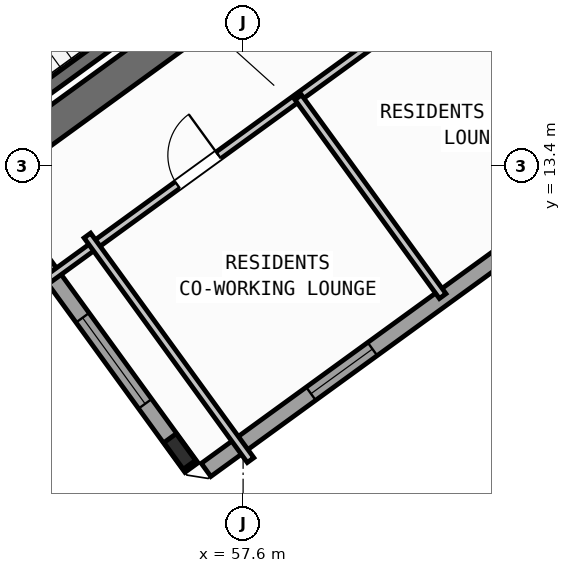
"""IFC4 building model, lengths in metres.
Left out: names, types, materials, properties, quantities, classifications, styles, units other than length and angle.
Written with IfcOpenShell. Run it as: python <this file> out.ifc"""

import sys

from ifc_helpers import new_model, si_unit, direction, frame, frame_2d, origin, origin_2d, place, context, subcontext, project, spatial, rectangle, i_section, extrude, source, transform, mapped, element, fill, save


model = new_model("IFC4")
c1 = context("Model", 3, precision=1e-05, world=origin(), true_north=direction((0.0, 1.0)))
c2 = subcontext(c1, "Body", "Model", "MODEL_VIEW")
j1 = project(units=[si_unit("LENGTHUNIT", "METRE"), si_unit("PLANEANGLEUNIT", "RADIAN")], contexts=[c1])
p1 = place(None, origin())
s1 = spatial("IfcSite", under=j1, at=p1, CompositionType="ELEMENT")
p2 = place(p1, origin())
s2 = spatial("IfcBuilding", under=s1, at=p2, CompositionType="ELEMENT")
p3 = place(p2, frame((0.0, 0.0, 42.0)))
s3 = spatial("IfcBuildingStorey", under=s2, at=p3, CompositionType="ELEMENT", Elevation=42.0)
p4 = place(p3, frame((52.318, 13.11, 0.0), z_axis=(0.0, 0.0, 1.0), x_axis=(0.809019445368, 0.587781878776, 0.0)))
e1 = element("IfcWall", 1, at=p4, inside=s3, PredefinedType="SHEAR", context=c2, shape_type="SweptSolid", body=[
    extrude(rectangle(XDim=12.44, YDim=0.65, at=frame_2d((6.22, 0.0))), origin(), (0.0, 0.0, 1.0), 3.35),
])
m1 = source(origin(), c2, "Body", "SweptSolid", [
    extrude(i_section(OverallWidth=0.3, OverallDepth=0.65, WebThickness=0.016, FlangeThickness=0.031, at=origin_2d()), origin(), (0.0, 0.0, 1.0), 3.6),
])
p5 = place(p3, frame((56.35, 7.758, 0.0), z_axis=(0.0, 0.0, 1.0), x_axis=(0.809016994375, 0.587785252292, 0.0)))
e2 = element("IfcColumn", 2, at=p5, inside=s3, PredefinedType="COLUMN", context=c2, shape_type="MappedRepresentation", body=[
    mapped(m1, transform((0.0, 0.0, 0.0), scale=1.0)),
])
p6 = place(p3, frame((71.098, 17.731, 0.0), z_axis=(0.0, 0.0, 1.0), x_axis=(-0.809021120468, -0.587779573171, 0.0)))
e3 = element("IfcWall", 3, at=p6, inside=s3, PredefinedType="STANDARD", context=c2, shape_type="SweptSolid", body=[
    extrude(rectangle(XDim=17.588, YDim=0.32, at=frame_2d((8.794, 0.0))), origin(), (0.0, 0.0, 1.0), 3.35),
])
p7 = place(p6, frame((1.624, 0.0, 0.0)))
e4 = element("IfcOpeningElement", 4, at=p7, cuts=e3, PredefinedType="OPENING", context=c2, shape_type="SweptSolid", body=[
    extrude(rectangle(XDim=1.05, YDim=2.15, at=frame_2d((0.525, 1.075))), frame((0.0, 0.17, 0.0), z_axis=(0.0, -1.0, 0.0), x_axis=(1.0, 0.0, 0.0)), (0.0, 0.0, 1.0), 0.34),
])
p8 = place(p6, frame((4.104, 0.0, 1.0)))
e5 = element("IfcOpeningElement", 5, at=p8, cuts=e3, PredefinedType="OPENING", context=c2, shape_type="SweptSolid", body=[
    extrude(rectangle(XDim=0.9, YDim=1.25, at=frame_2d((0.45, 0.625))), frame((0.0, 0.17, 0.0), z_axis=(0.0, -1.0, 0.0), x_axis=(1.0, 0.0, 0.0)), (0.0, 0.0, 1.0), 0.34),
])
p9 = place(p6, frame((7.879, 0.0, 0.85)))
e6 = element("IfcOpeningElement", 6, at=p9, cuts=e3, PredefinedType="OPENING", context=c2, shape_type="SweptSolid", body=[
    extrude(rectangle(XDim=1.8, YDim=1.5, at=frame_2d((0.9, 0.75))), frame((0.0, 0.17, 0.0), z_axis=(0.0, -1.0, 0.0), x_axis=(1.0, 0.0, 0.0)), (0.0, 0.0, 1.0), 0.34),
])
p10 = place(p6, frame((13.529, 0.0, 0.85)))
e7 = element("IfcOpeningElement", 7, at=p10, cuts=e3, PredefinedType="OPENING", context=c2, shape_type="SweptSolid", body=[
    extrude(rectangle(XDim=1.5, YDim=1.5, at=frame_2d((0.75, 0.75))), frame((0.0, 0.17, 0.0), z_axis=(0.0, -1.0, 0.0), x_axis=(1.0, 0.0, 0.0)), (0.0, 0.0, 1.0), 0.34),
])
p11 = place(p3, frame((56.581, 7.439, 0.0), z_axis=(0.0, 0.0, 1.0), x_axis=(-0.587785875463, 0.809016541614, 0.0)))
e8 = element("IfcWall", 8, at=p11, inside=s3, PredefinedType="STANDARD", context=c2, shape_type="SweptSolid", body=[
    extrude(rectangle(XDim=6.774, YDim=0.32, at=frame_2d((3.387, 0.0))), origin(), (0.0, 0.0, 1.0), 2.725),
])
p12 = place(p11, frame((1.556, 0.0, 0.8)))
e9 = element("IfcOpeningElement", 9, at=p12, cuts=e8, PredefinedType="OPENING", context=c2, shape_type="SweptSolid", body=[
    extrude(rectangle(XDim=2.1, YDim=1.55, at=frame_2d((1.05, 0.775))), frame((0.0, 0.17, 0.0), z_axis=(0.0, -1.0, 0.0), x_axis=(1.0, 0.0, 0.0)), (0.0, 0.0, 1.0), 0.34),
])
p13 = place(p3, frame((52.472, 14.013, 0.0), z_axis=(0.0, 0.0, 1.0), x_axis=(0.809028366311, 0.587769599847, 0.0)))
e10 = element("IfcWall", 10, at=p13, inside=s3, PredefinedType="SHEAR", context=c2, shape_type="SweptSolid", body=[
    extrude(rectangle(XDim=7.33, YDim=0.26, at=frame_2d((3.665, 0.0))), origin(), (0.0, 0.0, 1.0), 3.35),
])
p14 = place(p3, frame((53.705, 11.126, 0.0), z_axis=(0.0, 0.0, 1.0), x_axis=(0.809014504436, 0.587788679384, 0.0)))
e11 = element("IfcWall", 11, at=p14, inside=s3, PredefinedType="PARTITIONING", context=c2, shape_type="SweptSolid", body=[
    extrude(rectangle(XDim=14.67, YDim=0.16, at=frame_2d((7.335, 0.0))), origin(), (0.0, 0.0, 1.0), 3.34),
])
p15 = place(p14, frame((3.215, 0.0, 0.0)))
e12 = element("IfcOpeningElement", 12, at=p15, cuts=e11, PredefinedType="OPENING", context=c2, shape_type="SweptSolid", body=[
    extrude(rectangle(XDim=1.0, YDim=2.1, at=frame_2d((0.5, 1.05))), frame((0.0, 0.09, 0.0), z_axis=(0.0, -1.0, 0.0), x_axis=(1.0, 0.0, 0.0)), (0.0, 0.0, 1.0), 0.18),
])
p16 = place(p14, frame((9.915, 0.0, 0.0)))
e13 = element("IfcOpeningElement", 13, at=p16, cuts=e11, PredefinedType="OPENING", context=c2, shape_type="SweptSolid", body=[
    extrude(rectangle(XDim=1.0, YDim=2.1, at=frame_2d((0.5, 1.05))), frame((0.0, 0.09, 0.0), z_axis=(0.0, -1.0, 0.0), x_axis=(1.0, 0.0, 0.0)), (0.0, 0.0, 1.0), 0.18),
])
p17 = place(p3, frame((57.747, 7.586, 0.0), z_axis=(0.0, 0.0, 1.0), x_axis=(-0.587784893399, 0.809017255126, 0.0)))
e14 = element("IfcWall", 14, at=p17, inside=s3, PredefinedType="PARTITIONING", context=c2, shape_type="SweptSolid", body=[
    extrude(rectangle(XDim=5.48, YDim=0.16, at=frame_2d((2.74, 0.0))), origin(), (0.0, 0.0, 1.0), 3.34),
])
p18 = place(p3, frame((61.539, 10.823, 0.0), z_axis=(0.0, 0.0, 1.0), x_axis=(-0.587785532001, 0.809016791155, 0.0)))
e15 = element("IfcWall", 15, at=p18, inside=s3, PredefinedType="PARTITIONING", context=c2, shape_type="SweptSolid", body=[
    extrude(rectangle(XDim=4.85, YDim=0.16, at=frame_2d((2.425, 0.0))), origin(), (0.0, 0.0, 1.0), 3.34),
])
m2 = source(origin(), c2, "Body", "SweptSolid", [
    extrude(rectangle(XDim=1.5, YDim=1.5, at=frame_2d((0.75, 0.75))), frame((0.0, 0.03, 0.0), z_axis=(0.0, -1.0, 0.0), x_axis=(1.0, 0.0, 0.0)), (0.0, 0.0, 1.0), 0.06),
])
p19 = place(p10, origin())
e16 = element("IfcWindow", 16, at=p19, inside=s3, PartitioningType="SINGLE_PANEL", PredefinedType="WINDOW", context=c2, shape_type="MappedRepresentation", body=[
    mapped(m2, transform((0.0, 0.0, 0.0), scale=1.0)),
])
fill(e7, e16)
m3 = source(origin(), c2, "Body", "SweptSolid", [
    extrude(rectangle(XDim=2.1, YDim=1.55, at=frame_2d((1.05, 0.775))), frame((0.0, 0.03, 0.0), z_axis=(0.0, -1.0, 0.0), x_axis=(1.0, 0.0, 0.0)), (0.0, 0.0, 1.0), 0.06),
])
p20 = place(p12, origin())
e17 = element("IfcWindow", 17, at=p20, inside=s3, PartitioningType="SINGLE_PANEL", PredefinedType="WINDOW", context=c2, shape_type="MappedRepresentation", body=[
    mapped(m3, transform((0.0, 0.0, 0.0), scale=1.0)),
])
fill(e9, e17)
m4 = source(origin(), c2, "Body", "SweptSolid", [
    extrude(rectangle(XDim=1.0, YDim=2.1, at=frame_2d((0.5, 1.05))), frame((0.0, 0.025, 0.0), z_axis=(0.0, -1.0, 0.0), x_axis=(1.0, 0.0, 0.0)), (0.0, 0.0, 1.0), 0.05),
])
p21 = place(p15, origin())
e18 = element("IfcDoor", 18, at=p21, inside=s3, OperationType="SINGLE_SWING_RIGHT", PredefinedType="DOOR", context=c2, shape_type="MappedRepresentation", body=[
    mapped(m4, transform((0.0, 0.0, 0.0), scale=1.0)),
])
fill(e12, e18)
save(model, sys.argv[1])
